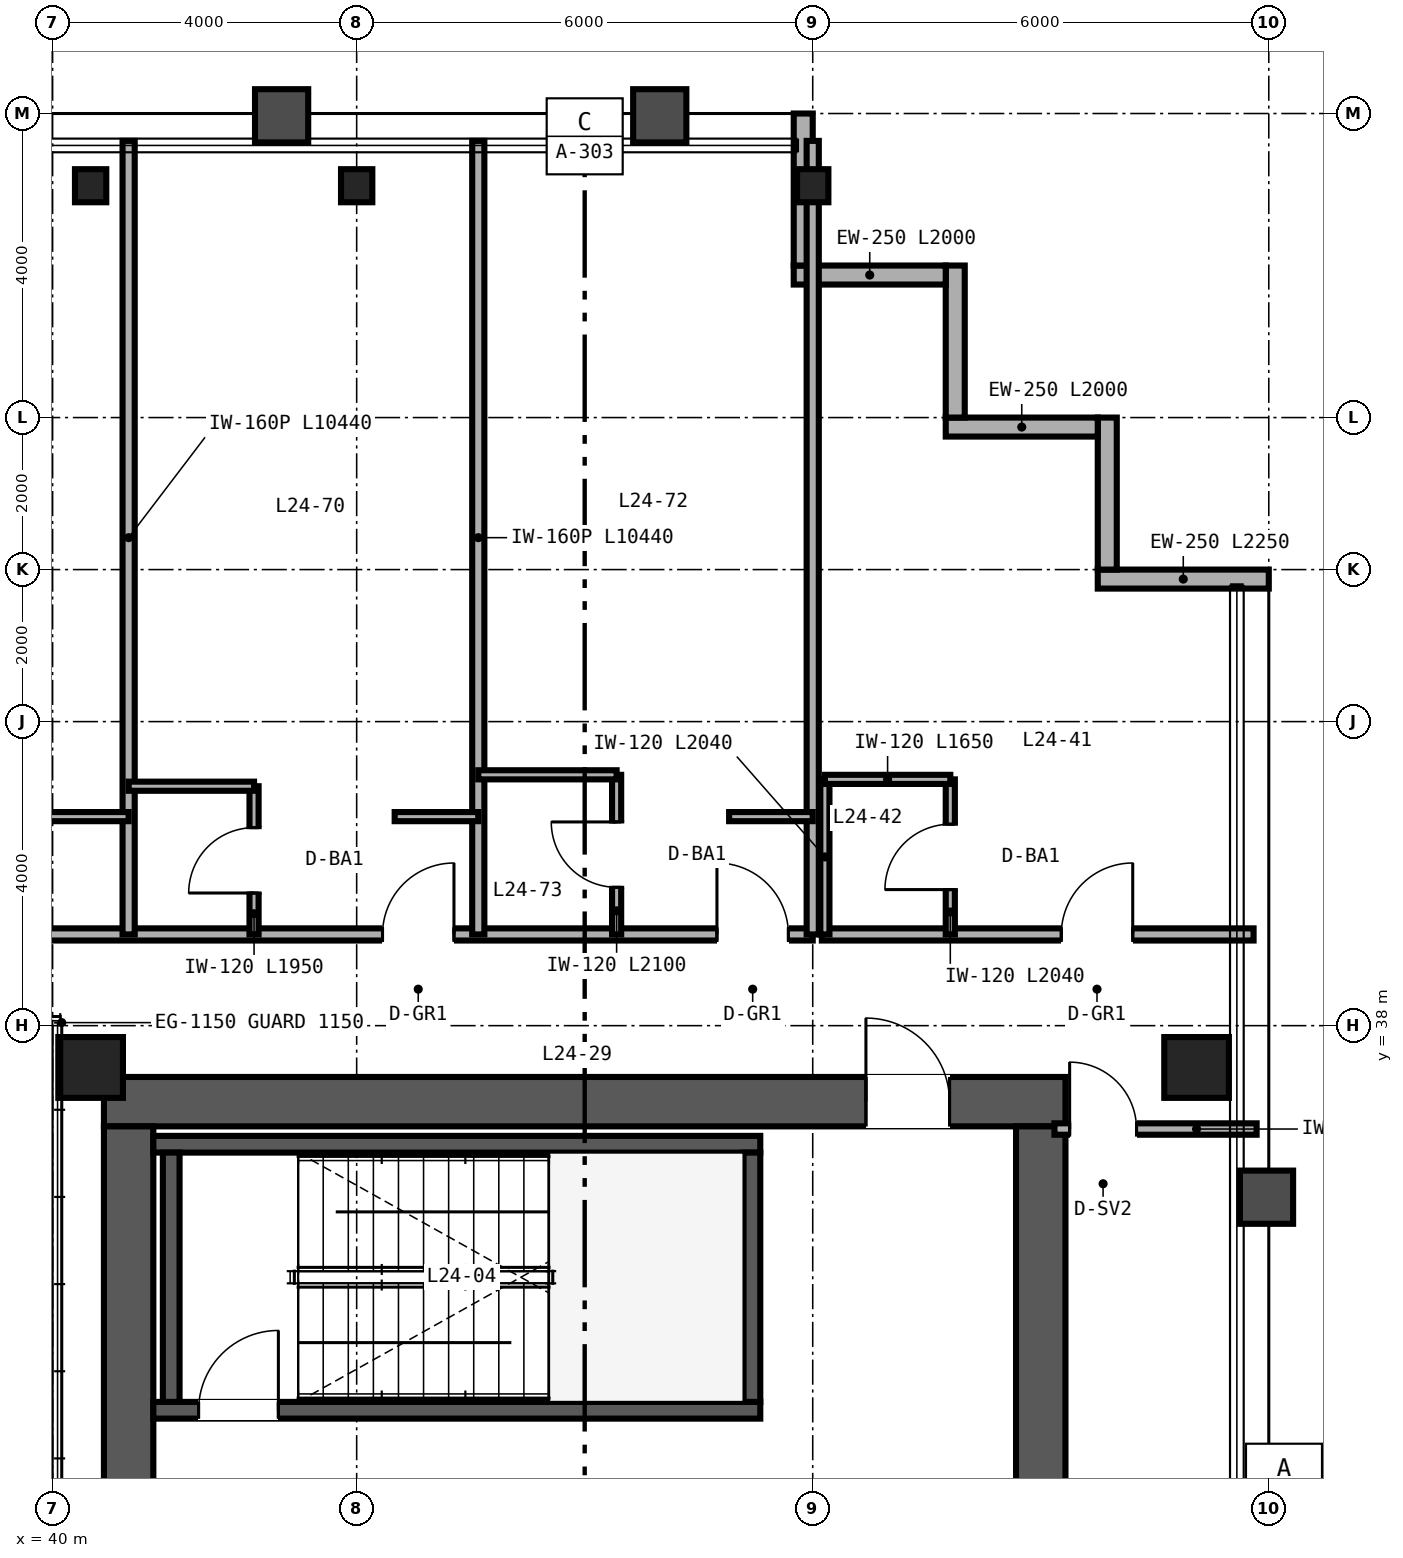
"""IFC4 building model, lengths in metres.
Left out: names, types, materials, properties, quantities, classifications, styles, units other than length and angle.
Written with IfcOpenShell. Run it as: python <this file> out.ifc"""

import sys

from ifc_helpers import new_model, si_unit, direction, frame, frame_2d, origin, origin_2d, place, context, subcontext, project, spatial, rectangle, hollow_rectangle, i_section, extrude, source, transform, mapped, element, fill, save


model = new_model("IFC4")
c1 = context("Model", 3, precision=1e-05, world=origin(), true_north=direction((0.0, 1.0)))
c2 = subcontext(c1, "Body", "Model", "MODEL_VIEW")
j1 = project(units=[si_unit("LENGTHUNIT", "METRE"), si_unit("PLANEANGLEUNIT", "RADIAN")], contexts=[c1])
p1 = place(None, origin())
s1 = spatial("IfcSite", under=j1, at=p1, CompositionType="ELEMENT")
p2 = place(p1, origin())
s2 = spatial("IfcBuilding", under=s1, at=p2, CompositionType="ELEMENT")
p3 = place(p2, frame((0.0, 0.0, 100.8)))
s3 = spatial("IfcBuildingStorey", under=s2, at=p3, CompositionType="ELEMENT", Elevation=100.8)
p4 = place(p3, frame((40.675, 37.0, 0.0), z_axis=(0.0, 0.0, 1.0), x_axis=(1.0, 0.0, 0.0)))
e1 = element("IfcWall", 1, at=p4, inside=s3, PredefinedType="SHEAR", context=c2, shape_type="SweptSolid", body=[
    extrude(rectangle(XDim=12.65, YDim=0.65, at=frame_2d((6.325, 0.0))), origin(), (0.0, 0.0, 1.0), 3.36),
])
p5 = place(p4, frame((10.025, 0.0, 0.0)))
e2 = element("IfcOpeningElement", 2, at=p5, cuts=e1, PredefinedType="OPENING", context=c2, shape_type="SweptSolid", body=[
    extrude(rectangle(XDim=1.1, YDim=2.15, at=frame_2d((0.55, 1.075))), frame((0.0, 0.335, 0.0), z_axis=(0.0, -1.0, 0.0), x_axis=(1.0, 0.0, 0.0)), (0.0, 0.0, 1.0), 0.67),
])
for number, where, z_axis, x_axis in (
    (3, (41.0, 15.325, 0.0), (0.0, 0.0, 1.0), (0.0, 1.0, 0.0)),
    (4, (53.0, 15.325, 0.0), (0.0, 0.0, 1.0), (0.0, 1.0, 0.0)),
):
    element("IfcWall", number, at=place(p3, frame(where, z_axis=z_axis, x_axis=x_axis)), inside=s3, PredefinedType="SHEAR", context=c2, shape_type="SweptSolid", body=[
        extrude(rectangle(XDim=21.35, YDim=0.65, at=frame_2d((10.675, 0.0))), origin(), (0.0, 0.0, 1.0), 3.36),
    ])
p6 = place(p3, frame((41.325, 32.94, 0.0), z_axis=(0.0, 0.0, 1.0), x_axis=(1.0, 0.0, 0.0)))
e5 = element("IfcWall", 5, at=p6, inside=s3, PredefinedType="SHEAR", context=c2, shape_type="SweptSolid", body=[
    extrude(rectangle(XDim=7.985, YDim=0.22, at=frame_2d((3.993, 0.0))), origin(), (0.0, 0.0, 1.0), 3.4),
])
p7 = place(p6, frame((0.595, 0.0, 0.0)))
e6 = element("IfcOpeningElement", 6, at=p7, cuts=e5, PredefinedType="OPENING", context=c2, shape_type="SweptSolid", body=[
    extrude(rectangle(XDim=1.05, YDim=2.15, at=frame_2d((0.525, 1.075))), frame((0.0, 0.12, 0.0), z_axis=(0.0, -1.0, 0.0), x_axis=(1.0, 0.0, 0.0)), (0.0, 0.0, 1.0), 0.24),
])
p8 = place(p3, frame((41.325, 36.44, 0.0), z_axis=(0.0, 0.0, 1.0), x_axis=(1.0, 0.0, 0.0)))
e7 = element("IfcWall", 7, at=p8, inside=s3, PredefinedType="SHEAR", context=c2, shape_type="SweptSolid", body=[
    extrude(rectangle(XDim=7.985, YDim=0.22, at=frame_2d((3.993, 0.0))), origin(), (0.0, 0.0, 1.0), 3.4),
])
for number, where, z_axis, x_axis in (
    (8, (41.56, 33.05, 0.0), (0.0, 0.0, 1.0), (0.0, 1.0, 0.0)),
    (9, (49.2, 33.05, 0.0), (0.0, 0.0, 1.0), (0.0, 1.0, 0.0)),
):
    element("IfcWall", number, at=place(p3, frame(where, z_axis=z_axis, x_axis=x_axis)), inside=s3, PredefinedType="SHEAR", context=c2, shape_type="SweptSolid", body=[
        extrude(rectangle(XDim=3.28, YDim=0.22, at=frame_2d((1.64, 0.0))), origin(), (0.0, 0.0, 1.0), 3.4),
    ])
m1 = source(origin(), c2, "Body", "SweptSolid", [
    extrude(hollow_rectangle(XDim=0.85, YDim=0.8, WallThickness=0.032, at=origin_2d()), origin(), (0.0, 0.0, 1.0), 3.36),
])
for number, where, z_axis, x_axis in (
    (10, (40.5, 37.45, 0.0), (0.0, 0.0, 1.0), (1.0, 0.0, 0.0)),
    (11, (55.05, 37.45, 0.0), (0.0, 0.0, 1.0), (1.0, 0.0, 0.0)),
):
    element("IfcColumn", number, at=place(p3, frame(where, z_axis=z_axis, x_axis=x_axis)), inside=s3, PredefinedType="COLUMN", context=c2, shape_type="MappedRepresentation", body=[
        mapped(m1, transform((0.0, 0.0, 0.0), scale=1.0)),
    ])
m2 = source(origin(), c2, "Body", "SweptSolid", [
    extrude(i_section(OverallWidth=0.412, OverallDepth=0.435, WebThickness=0.036, FlangeThickness=0.057, FilletRadius=0.025, at=origin_2d()), origin(), (0.0, 0.0, 1.0), 3.36),
])
for number, where, z_axis, x_axis in (
    (12, (40.5, 49.05, 0.0), (0.0, 0.0, 1.0), (1.0, 0.0, 0.0)),
    (13, (44.0, 49.05, 0.0), (0.0, 0.0, 1.0), (1.0, 0.0, 0.0)),
    (14, (50.0, 49.05, 0.0), (0.0, 0.0, 1.0), (1.0, 0.0, 0.0)),
):
    element("IfcColumn", number, at=place(p3, frame(where, z_axis=z_axis, x_axis=x_axis)), inside=s3, PredefinedType="COLUMN", context=c2, shape_type="MappedRepresentation", body=[
        mapped(m2, transform((0.0, 0.0, 0.0), scale=1.0)),
    ])
p9 = place(p3, frame((56.0, 43.875, 0.0), z_axis=(0.0, 0.0, 1.0), x_axis=(-1.0, 0.0, 0.0)))
e15 = element("IfcWall", 15, at=p9, inside=s3, PredefinedType="SOLIDWALL", context=c2, shape_type="SweptSolid", body=[
    extrude(rectangle(XDim=2.25, YDim=0.25, at=frame_2d((1.125, 0.0))), origin(), (0.0, 0.0, 1.0), 3.36),
])
for number, where, z_axis, x_axis in (
    (16, (53.875, 44.0, 0.0), (0.0, 0.0, 1.0), (0.0, 1.0, 0.0)),
    (17, (53.75, 45.875, 0.0), (0.0, 0.0, 1.0), (-1.0, 0.0, 0.0)),
    (18, (51.875, 46.0, 0.0), (0.0, 0.0, 1.0), (0.0, 1.0, 0.0)),
    (19, (51.75, 47.875, 0.0), (0.0, 0.0, 1.0), (-1.0, 0.0, 0.0)),
):
    element("IfcWall", number, at=place(p3, frame(where, z_axis=z_axis, x_axis=x_axis)), inside=s3, PredefinedType="SOLIDWALL", context=c2, shape_type="SweptSolid", body=[
        extrude(rectangle(XDim=2.0, YDim=0.25, at=frame_2d((1.0, 0.0))), origin(), (0.0, 0.0, 1.0), 3.36),
    ])
p10 = place(p3, frame((49.875, 48.0, 0.0), z_axis=(0.0, 0.0, 1.0), x_axis=(0.0, 1.0, 0.0)))
e20 = element("IfcWall", 20, at=p10, inside=s3, PredefinedType="SOLIDWALL", context=c2, shape_type="SweptSolid", body=[
    extrude(rectangle(XDim=2.0, YDim=0.25, at=frame_2d((1.0, 0.0))), origin(), (0.0, 0.0, 1.0), 2.667),
])
p11 = place(p3, frame((53.18, 36.64, 0.0), z_axis=(0.0, 0.0, 1.0), x_axis=(1.0, 0.0, 0.0)))
e21 = element("IfcWall", 21, at=p11, inside=s3, PredefinedType="PARTITIONING", context=c2, shape_type="SweptSolid", body=[
    extrude(rectangle(XDim=2.66, YDim=0.15, at=frame_2d((1.33, 0.0))), origin(), (0.0, 0.0, 1.0), 2.743),
])
p12 = place(p11, frame((0.2, 0.0, 0.0)))
e22 = element("IfcOpeningElement", 22, at=p12, cuts=e21, PredefinedType="OPENING", context=c2, shape_type="SweptSolid", body=[
    extrude(rectangle(XDim=0.88, YDim=2.15, at=frame_2d((0.44, 1.075))), frame((0.0, 0.085, 0.0), z_axis=(0.0, -1.0, 0.0), x_axis=(1.0, 0.0, 0.0)), (0.0, 0.0, 1.0), 0.17),
])
p13 = place(p3, frame((50.12, 39.2, 0.0), z_axis=(0.0, 0.0, 1.0), x_axis=(1.0, 0.0, 0.0)))
e23 = element("IfcWall", 23, at=p13, inside=s3, PredefinedType="PARTITIONING", context=c2, shape_type="SweptSolid", body=[
    extrude(rectangle(XDim=5.68, YDim=0.16, at=frame_2d((2.84, 0.0))), origin(), (0.0, 0.0, 1.0), 3.36),
])
p14 = place(p13, frame((3.15, 0.0, 0.0)))
e24 = element("IfcOpeningElement", 24, at=p14, cuts=e23, PredefinedType="OPENING", context=c2, shape_type="SweptSolid", body=[
    extrude(rectangle(XDim=0.94, YDim=2.15, at=frame_2d((0.47, 1.075))), frame((0.0, 0.09, 0.0), z_axis=(0.0, -1.0, 0.0), x_axis=(1.0, 0.0, 0.0)), (0.0, 0.0, 1.0), 0.18),
])
p15 = place(p3, frame((51.81, 39.2, 0.0), z_axis=(0.0, 0.0, 1.0), x_axis=(0.0, 1.0, 0.0)))
e25 = element("IfcWall", 25, at=p15, inside=s3, PredefinedType="PARTITIONING", context=c2, shape_type="SweptSolid", body=[
    extrude(rectangle(XDim=2.04, YDim=0.12, at=frame_2d((1.02, 0.0))), origin(), (0.0, 0.0, 1.0), 3.36),
])
p16 = place(p15, frame((0.59, 0.0, 0.0)))
e26 = element("IfcOpeningElement", 26, at=p16, cuts=e25, PredefinedType="OPENING", context=c2, shape_type="SweptSolid", body=[
    extrude(rectangle(XDim=0.86, YDim=2.1, at=frame_2d((0.43, 1.05))), frame((0.0, 0.07, 0.0), z_axis=(0.0, -1.0, 0.0), x_axis=(1.0, 0.0, 0.0)), (0.0, 0.0, 1.0), 0.14),
])
p17 = place(p3, frame((50.16, 39.2, 0.0), z_axis=(0.0, 0.0, 1.0), x_axis=(0.0, 1.0, 0.0)))
e27 = element("IfcWall", 27, at=p17, inside=s3, PredefinedType="PARTITIONING", context=c2, shape_type="SweptSolid", body=[
    extrude(rectangle(XDim=2.04, YDim=0.12, at=frame_2d((1.02, 0.0))), origin(), (0.0, 0.0, 1.0), 3.36),
])
p18 = place(p3, frame((50.16, 41.24, 0.0), z_axis=(0.0, 0.0, 1.0), x_axis=(1.0, 0.0, 0.0)))
e28 = element("IfcWall", 28, at=p18, inside=s3, PredefinedType="PARTITIONING", context=c2, shape_type="SweptSolid", body=[
    extrude(rectangle(XDim=1.65, YDim=0.12, at=frame_2d((0.825, 0.0))), origin(), (0.0, 0.0, 1.0), 3.36),
])
p19 = place(p3, frame((14.0, 39.2, 0.0), z_axis=(0.0, 0.0, 1.0), x_axis=(1.0, 0.0, 0.0)))
e29 = element("IfcWall", 29, at=p19, inside=s3, PredefinedType="PARTITIONING", context=c2, shape_type="SweptSolid", body=[
    extrude(rectangle(XDim=36.0, YDim=0.16, at=frame_2d((18.0, 0.0))), origin(), (0.0, 0.0, 1.0), 2.581),
])
p20 = place(p19, frame((3.94, 0.0, 0.0)))
e30 = element("IfcOpeningElement", 30, at=p20, cuts=e29, PredefinedType="OPENING", context=c2, shape_type="SweptSolid", body=[
    extrude(rectangle(XDim=0.94, YDim=2.15, at=frame_2d((0.47, 1.075))), frame((0.0, 0.09, 0.0), z_axis=(0.0, -1.0, 0.0), x_axis=(1.0, 0.0, 0.0)), (0.0, 0.0, 1.0), 0.18),
])
p21 = place(p19, frame((7.89, 0.0, 0.0)))
e31 = element("IfcOpeningElement", 31, at=p21, cuts=e29, PredefinedType="OPENING", context=c2, shape_type="SweptSolid", body=[
    extrude(rectangle(XDim=0.94, YDim=2.15, at=frame_2d((0.47, 1.075))), frame((0.0, 0.09, 0.0), z_axis=(0.0, -1.0, 0.0), x_axis=(1.0, 0.0, 0.0)), (0.0, 0.0, 1.0), 0.18),
])
p22 = place(p19, frame((14.94, 0.0, 0.0)))
e32 = element("IfcOpeningElement", 32, at=p22, cuts=e29, PredefinedType="OPENING", context=c2, shape_type="SweptSolid", body=[
    extrude(rectangle(XDim=0.94, YDim=2.15, at=frame_2d((0.47, 1.075))), frame((0.0, 0.09, 0.0), z_axis=(0.0, -1.0, 0.0), x_axis=(1.0, 0.0, 0.0)), (0.0, 0.0, 1.0), 0.18),
])
p23 = place(p19, frame((18.72, 0.0, 0.0)))
e33 = element("IfcOpeningElement", 33, at=p23, cuts=e29, PredefinedType="OPENING", context=c2, shape_type="SweptSolid", body=[
    extrude(rectangle(XDim=0.96, YDim=2.15, at=frame_2d((0.48, 1.075))), frame((0.0, 0.09, 0.0), z_axis=(0.0, -1.0, 0.0), x_axis=(1.0, 0.0, 0.0)), (0.0, 0.0, 1.0), 0.18),
])
p24 = place(p19, frame((24.79, 0.0, 0.0)))
e34 = element("IfcOpeningElement", 34, at=p24, cuts=e29, PredefinedType="OPENING", context=c2, shape_type="SweptSolid", body=[
    extrude(rectangle(XDim=0.94, YDim=2.15, at=frame_2d((0.47, 1.075))), frame((0.0, 0.09, 0.0), z_axis=(0.0, -1.0, 0.0), x_axis=(1.0, 0.0, 0.0)), (0.0, 0.0, 1.0), 0.18),
])
p25 = place(p19, frame((30.34, 0.0, 0.0)))
e35 = element("IfcOpeningElement", 35, at=p25, cuts=e29, PredefinedType="OPENING", context=c2, shape_type="SweptSolid", body=[
    extrude(rectangle(XDim=0.94, YDim=2.15, at=frame_2d((0.47, 1.075))), frame((0.0, 0.09, 0.0), z_axis=(0.0, -1.0, 0.0), x_axis=(1.0, 0.0, 0.0)), (0.0, 0.0, 1.0), 0.18),
])
p26 = place(p19, frame((34.74, 0.0, 0.0)))
e36 = element("IfcOpeningElement", 36, at=p26, cuts=e29, PredefinedType="OPENING", context=c2, shape_type="SweptSolid", body=[
    extrude(rectangle(XDim=0.94, YDim=2.15, at=frame_2d((0.47, 1.075))), frame((0.0, 0.09, 0.0), z_axis=(0.0, -1.0, 0.0), x_axis=(1.0, 0.0, 0.0)), (0.0, 0.0, 1.0), 0.18),
])
p27 = place(p3, frame((50.0, 39.2, 0.0), z_axis=(0.0, 0.0, 1.0), x_axis=(0.0, 1.0, 0.0)))
e37 = element("IfcWall", 37, at=p27, inside=s3, PredefinedType="PARTITIONING", context=c2, shape_type="SweptSolid", body=[
    extrude(rectangle(XDim=10.44, YDim=0.16, at=frame_2d((5.22, 0.0))), origin(), (0.0, 0.0, 1.0), 2.667),
])
p28 = place(p3, frame((41.0, 39.2, 0.0), z_axis=(0.0, 0.0, 1.0), x_axis=(0.0, 1.0, 0.0)))
e38 = element("IfcWall", 38, at=p28, inside=s3, PredefinedType="PARTITIONING", context=c2, shape_type="SweptSolid", body=[
    extrude(rectangle(XDim=10.44, YDim=0.16, at=frame_2d((5.22, 0.0))), origin(), (0.0, 0.0, 1.0), 2.823),
])
p29 = place(p3, frame((39.9, 40.75, 0.0), z_axis=(0.0, 0.0, 1.0), x_axis=(1.0, 0.0, 0.0)))
e39 = element("IfcWall", 39, at=p29, inside=s3, PredefinedType="PARTITIONING", context=c2, shape_type="SweptSolid", body=[
    extrude(rectangle(XDim=1.1, YDim=0.12, at=frame_2d((0.55, 0.0))), origin(), (0.0, 0.0, 1.0), 2.581),
])
p30 = place(p3, frame((45.6, 39.2, 0.0), z_axis=(0.0, 0.0, 1.0), x_axis=(0.0, 1.0, 0.0)))
e40 = element("IfcWall", 40, at=p30, inside=s3, PredefinedType="PARTITIONING", context=c2, shape_type="SweptSolid", body=[
    extrude(rectangle(XDim=10.44, YDim=0.16, at=frame_2d((5.22, 0.0))), origin(), (0.0, 0.0, 1.0), 2.667),
])
p31 = place(p3, frame((42.65, 39.2, 0.0), z_axis=(0.0, 0.0, 1.0), x_axis=(0.0, 1.0, 0.0)))
e41 = element("IfcWall", 41, at=p31, inside=s3, PredefinedType="PARTITIONING", context=c2, shape_type="SweptSolid", body=[
    extrude(rectangle(XDim=1.95, YDim=0.12, at=frame_2d((0.975, 0.0))), origin(), (0.0, 0.0, 1.0), 3.36),
])
p32 = place(p31, frame((0.545, 0.0, 0.0)))
e42 = element("IfcOpeningElement", 42, at=p32, cuts=e41, PredefinedType="OPENING", context=c2, shape_type="SweptSolid", body=[
    extrude(rectangle(XDim=0.86, YDim=2.1, at=frame_2d((0.43, 1.05))), frame((0.0, 0.07, 0.0), z_axis=(0.0, -1.0, 0.0), x_axis=(1.0, 0.0, 0.0)), (0.0, 0.0, 1.0), 0.14),
])
p33 = place(p3, frame((41.0, 41.15, 0.0), z_axis=(0.0, 0.0, 1.0), x_axis=(1.0, 0.0, 0.0)))
e43 = element("IfcWall", 43, at=p33, inside=s3, PredefinedType="PARTITIONING", context=c2, shape_type="SweptSolid", body=[
    extrude(rectangle(XDim=1.65, YDim=0.12, at=frame_2d((0.825, 0.0))), origin(), (0.0, 0.0, 1.0), 3.36),
])
p34 = place(p3, frame((44.5, 40.75, 0.0), z_axis=(0.0, 0.0, 1.0), x_axis=(1.0, 0.0, 0.0)))
e44 = element("IfcWall", 44, at=p34, inside=s3, PredefinedType="PARTITIONING", context=c2, shape_type="SweptSolid", body=[
    extrude(rectangle(XDim=1.1, YDim=0.12, at=frame_2d((0.55, 0.0))), origin(), (0.0, 0.0, 1.0), 3.36),
])
p35 = place(p3, frame((47.42, 39.2, 0.0), z_axis=(0.0, 0.0, 1.0), x_axis=(0.0, 1.0, 0.0)))
e45 = element("IfcWall", 45, at=p35, inside=s3, PredefinedType="PARTITIONING", context=c2, shape_type="SweptSolid", body=[
    extrude(rectangle(XDim=2.1, YDim=0.12, at=frame_2d((1.05, 0.0))), origin(), (0.0, 0.0, 1.0), 3.36),
])
p36 = place(p35, frame((0.62, 0.0, 0.0)))
e46 = element("IfcOpeningElement", 46, at=p36, cuts=e45, PredefinedType="OPENING", context=c2, shape_type="SweptSolid", body=[
    extrude(rectangle(XDim=0.86, YDim=2.1, at=frame_2d((0.43, 1.05))), frame((0.0, 0.07, 0.0), z_axis=(0.0, -1.0, 0.0), x_axis=(1.0, 0.0, 0.0)), (0.0, 0.0, 1.0), 0.14),
])
p37 = place(p3, frame((45.6, 41.3, 0.0), z_axis=(0.0, 0.0, 1.0), x_axis=(1.0, 0.0, 0.0)))
e47 = element("IfcWall", 47, at=p37, inside=s3, PredefinedType="PARTITIONING", context=c2, shape_type="SweptSolid", body=[
    extrude(rectangle(XDim=1.82, YDim=0.12, at=frame_2d((0.91, 0.0))), origin(), (0.0, 0.0, 1.0), 3.36),
])
p38 = place(p3, frame((48.9, 40.75, 0.0), z_axis=(0.0, 0.0, 1.0), x_axis=(1.0, 0.0, 0.0)))
e48 = element("IfcWall", 48, at=p38, inside=s3, PredefinedType="PARTITIONING", context=c2, shape_type="SweptSolid", body=[
    extrude(rectangle(XDim=1.1, YDim=0.12, at=frame_2d((0.55, 0.0))), origin(), (0.0, 0.0, 1.0), 3.36),
])
m3 = source(origin(), c2, "Body", "SweptSolid", [
    extrude(rectangle(XDim=1.05, YDim=2.15, at=frame_2d((0.525, 1.075))), frame((0.0, 0.025, 0.0), z_axis=(0.0, -1.0, 0.0), x_axis=(1.0, 0.0, 0.0)), (0.0, 0.0, 1.0), 0.05),
])
p39 = place(p7, origin())
e49 = element("IfcDoor", 49, at=p39, inside=s3, OperationType="SINGLE_SWING_RIGHT", PredefinedType="DOOR", context=c2, shape_type="MappedRepresentation", body=[
    mapped(m3, transform((0.0, 0.0, 0.0), scale=1.0)),
])
fill(e6, e49)
m4 = source(origin(), c2, "Body", "SweptSolid", [
    extrude(rectangle(XDim=1.1, YDim=2.15, at=frame_2d((0.55, 1.075))), frame((0.0, 0.025, 0.0), z_axis=(0.0, -1.0, 0.0), x_axis=(1.0, 0.0, 0.0)), (0.0, 0.0, 1.0), 0.05),
])
p40 = place(p5, origin())
e50 = element("IfcDoor", 50, at=p40, inside=s3, OperationType="SINGLE_SWING_LEFT", PredefinedType="DOOR", context=c2, shape_type="MappedRepresentation", body=[
    mapped(m4, transform((0.0, 0.0, 0.0), scale=1.0)),
])
fill(e2, e50)
m5 = source(origin(), c2, "Body", "SweptSolid", [
    extrude(rectangle(XDim=0.88, YDim=2.15, at=frame_2d((0.44, 1.075))), frame((0.0, 0.025, 0.0), z_axis=(0.0, -1.0, 0.0), x_axis=(1.0, 0.0, 0.0)), (0.0, 0.0, 1.0), 0.05),
])
p41 = place(p12, origin())
e51 = element("IfcDoor", 51, at=p41, inside=s3, OperationType="SINGLE_SWING_LEFT", PredefinedType="DOOR", context=c2, shape_type="MappedRepresentation", body=[
    mapped(m5, transform((0.0, 0.0, 0.0), scale=1.0)),
])
fill(e22, e51)
m6 = source(origin(), c2, "Body", "SweptSolid", [
    extrude(rectangle(XDim=0.86, YDim=2.1, at=frame_2d((0.43, 1.05))), frame((0.0, 0.025, 0.0), z_axis=(0.0, -1.0, 0.0), x_axis=(1.0, 0.0, 0.0)), (0.0, 0.0, 1.0), 0.05),
])
p42 = place(p16, origin())
e52 = element("IfcDoor", 52, at=p42, inside=s3, OperationType="SINGLE_SWING_LEFT", PredefinedType="DOOR", context=c2, shape_type="MappedRepresentation", body=[
    mapped(m6, transform((0.0, 0.0, 0.0), scale=1.0)),
])
fill(e26, e52)
m7 = source(origin(), c2, "Body", "SweptSolid", [
    extrude(rectangle(XDim=0.94, YDim=2.15, at=frame_2d((0.47, 1.075))), frame((0.0, 0.025, 0.0), z_axis=(0.0, -1.0, 0.0), x_axis=(1.0, 0.0, 0.0)), (0.0, 0.0, 1.0), 0.05),
])
p43 = place(p14, origin())
e53 = element("IfcDoor", 53, at=p43, inside=s3, OperationType="SINGLE_SWING_RIGHT", PredefinedType="DOOR", context=c2, shape_type="MappedRepresentation", body=[
    mapped(m7, transform((0.0, 0.0, 0.0), scale=1.0)),
])
fill(e24, e53)
p44 = place(p32, origin())
e54 = element("IfcDoor", 54, at=p44, inside=s3, OperationType="SINGLE_SWING_LEFT", PredefinedType="DOOR", context=c2, shape_type="MappedRepresentation", body=[
    mapped(m6, transform((0.0, 0.0, 0.0), scale=1.0)),
])
fill(e42, e54)
p45 = place(p36, origin())
e55 = element("IfcDoor", 55, at=p45, inside=s3, OperationType="SINGLE_SWING_RIGHT", PredefinedType="DOOR", context=c2, shape_type="MappedRepresentation", body=[
    mapped(m6, transform((0.0, 0.0, 0.0), scale=1.0)),
])
fill(e46, e55)
p46 = place(p25, origin())
e56 = element("IfcDoor", 56, at=p46, inside=s3, OperationType="SINGLE_SWING_RIGHT", PredefinedType="DOOR", context=c2, shape_type="MappedRepresentation", body=[
    mapped(m7, transform((0.0, 0.0, 0.0), scale=1.0)),
])
fill(e35, e56)
p47 = place(p26, origin())
e57 = element("IfcDoor", 57, at=p47, inside=s3, OperationType="SINGLE_SWING_LEFT", PredefinedType="DOOR", context=c2, shape_type="MappedRepresentation", body=[
    mapped(m7, transform((0.0, 0.0, 0.0), scale=1.0)),
])
fill(e36, e57)
save(model, sys.argv[1])
